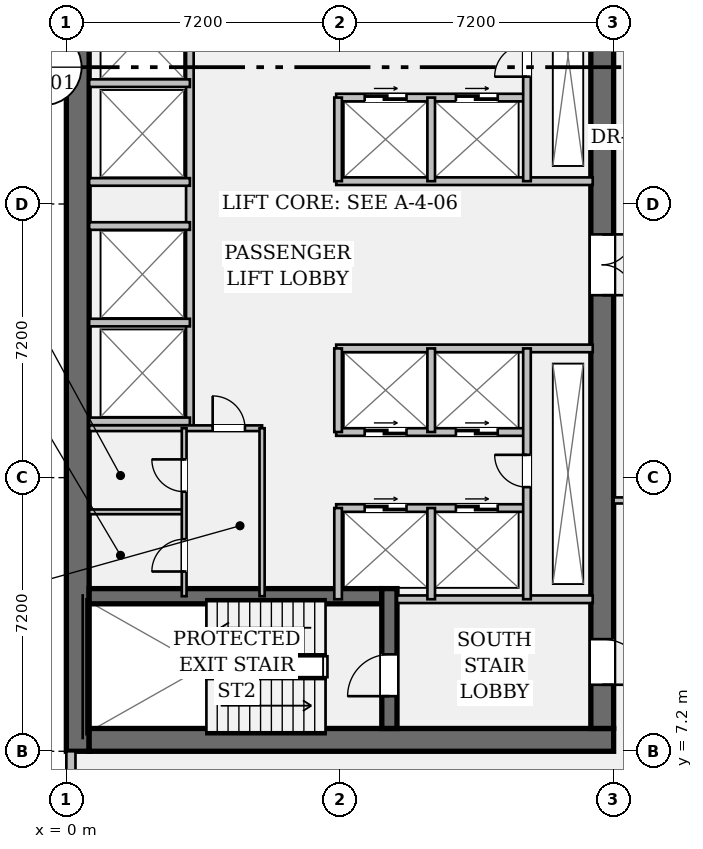
"""IFC4 building model, lengths in metres.
Left out: names, types, materials, properties, quantities, classifications, styles, units other than length and angle.
Written with IfcOpenShell. Run it as: python <this file> out.ifc"""

import sys

from ifc_helpers import new_model, si_unit, direction, frame, frame_2d, origin, place, context, subcontext, project, spatial, rectangle, extrude, element, fill, save


model = new_model("IFC4")
c1 = context("Model", 3, precision=1e-05, world=origin(), true_north=direction((0.0, 1.0)))
c2 = subcontext(c1, "Body", "Model", "MODEL_VIEW")
j1 = project(units=[si_unit("LENGTHUNIT", "METRE"), si_unit("PLANEANGLEUNIT", "RADIAN")], contexts=[c1])
p1 = place(None, origin())
s1 = spatial("IfcSite", under=j1, at=p1, CompositionType="ELEMENT")
p2 = place(p1, origin())
s2 = spatial("IfcBuilding", under=s1, at=p2, CompositionType="ELEMENT")
p3 = place(p2, frame((0.0, 0.0, 97.65)))
s3 = spatial("IfcBuildingStorey", under=s2, at=p3, CompositionType="ELEMENT", Elevation=97.65)
p4 = place(p3, frame((0.3, 7.2, 0.0), z_axis=(0.0, 0.0, 1.0), x_axis=(0.0, 1.0, 0.0)))
e1 = element("IfcWall", 1, at=p4, inside=s3, PredefinedType="SHEAR", context=c2, shape_type="SweptSolid", body=[
    extrude(rectangle(XDim=28.8, YDim=0.6, at=frame_2d((14.4, 0.0))), origin(), (0.0, 0.0, 1.0), 4.28),
])
p5 = place(p3, frame((0.6, 7.5, 0.0), z_axis=(0.0, 0.0, 1.0), x_axis=(1.0, 0.0, 0.0)))
e2 = element("IfcWall", 2, at=p5, inside=s3, PredefinedType="SHEAR", context=c2, shape_type="SweptSolid", body=[
    extrude(rectangle(XDim=13.8, YDim=0.6, at=frame_2d((6.9, 0.0))), origin(), (0.0, 0.0, 1.0), 4.28),
])
p6 = place(p3, frame((14.1, 35.4, 0.0), z_axis=(0.0, 0.0, 1.0), x_axis=(0.0, -1.0, 0.0)))
e3 = element("IfcWall", 3, at=p6, inside=s3, PredefinedType="SHEAR", context=c2, shape_type="SweptSolid", body=[
    extrude(rectangle(XDim=27.6, YDim=0.6, at=frame_2d((13.8, 0.0))), origin(), (0.0, 0.0, 1.0), 4.28),
])
p7 = place(p6, frame((1.3, 0.0, 0.0)))
e4 = element("IfcOpeningElement", 4, at=p7, cuts=e3, PredefinedType="OPENING", context=c2, shape_type="SweptSolid", body=[
    extrude(rectangle(XDim=1.2, YDim=2.15, at=frame_2d((0.6, 1.075))), frame((0.0, 0.312, 0.0), z_axis=(0.0, -1.0, 0.0), x_axis=(1.0, 0.0, 0.0)), (0.0, 0.0, 1.0), 0.624),
])
p8 = place(p6, frame((25.25, 0.0, 0.0)))
e5 = element("IfcOpeningElement", 5, at=p8, cuts=e3, PredefinedType="OPENING", context=c2, shape_type="SweptSolid", body=[
    extrude(rectangle(XDim=1.2, YDim=2.15, at=frame_2d((0.6, 1.075))), frame((0.0, 0.312, 0.0), z_axis=(0.0, -1.0, 0.0), x_axis=(1.0, 0.0, 0.0)), (0.0, 0.0, 1.0), 0.624),
])
p9 = place(p6, frame((14.6, 0.0, 0.0)))
e6 = element("IfcOpeningElement", 6, at=p9, cuts=e3, PredefinedType="OPENING", context=c2, shape_type="SweptSolid", body=[
    extrude(rectangle(XDim=1.6, YDim=2.2, at=frame_2d((0.8, 1.1))), frame((0.0, 0.312, 0.0), z_axis=(0.0, -1.0, 0.0), x_axis=(1.0, 0.0, 0.0)), (0.0, 0.0, 1.0), 0.624),
])
p10 = place(p3, frame((0.6, 11.28, 0.0), z_axis=(0.0, 0.0, 1.0), x_axis=(1.0, 0.0, 0.0)))
e7 = element("IfcWall", 7, at=p10, inside=s3, PredefinedType="SHEAR", context=c2, shape_type="SweptSolid", body=[
    extrude(rectangle(XDim=7.7, YDim=0.4, at=frame_2d((3.85, 0.0))), origin(), (0.0, 0.0, 1.0), 4.28),
])
p11 = place(p3, frame((8.5, 7.8, 0.0), z_axis=(0.0, 0.0, 1.0), x_axis=(0.0, 1.0, 0.0)))
e8 = element("IfcWall", 8, at=p11, inside=s3, PredefinedType="SHEAR", context=c2, shape_type="SweptSolid", body=[
    extrude(rectangle(XDim=3.68, YDim=0.4, at=frame_2d((1.84, 0.0))), origin(), (0.0, 0.0, 1.0), 4.28),
])
p12 = place(p11, frame((0.85, 0.0, 0.0)))
e9 = element("IfcOpeningElement", 9, at=p12, cuts=e8, PredefinedType="OPENING", context=c2, shape_type="SweptSolid", body=[
    extrude(rectangle(XDim=1.1, YDim=2.15, at=frame_2d((0.55, 1.075))), frame((0.0, 0.212, 0.0), z_axis=(0.0, -1.0, 0.0), x_axis=(1.0, 0.0, 0.0)), (0.0, 0.0, 1.0), 0.424),
])
p13 = place(p3, frame((0.12, 5.95, 0.0), z_axis=(0.0, 0.0, 1.0), x_axis=(0.0, 1.0, 0.0)))
e10 = element("IfcWall", 10, at=p13, inside=s3, PredefinedType="STANDARD", context=c2, shape_type="SweptSolid", body=[
    extrude(rectangle(XDim=1.25, YDim=0.24, at=frame_2d((0.625, 0.0))), origin(), (0.0, 0.0, 1.0), 4.28),
])
p14 = place(p3, frame((8.7, 11.2, 0.0), z_axis=(0.0, 0.0, 1.0), x_axis=(1.0, 0.0, 0.0)))
e11 = element("IfcWall", 11, at=p14, inside=s3, PredefinedType="PARTITIONING", context=c2, shape_type="SweptSolid", body=[
    extrude(rectangle(XDim=5.15, YDim=0.2, at=frame_2d((2.575, 0.0))), origin(), (0.0, 0.0, 1.0), 4.28),
])
p15 = place(p3, frame((3.25, 15.7, 0.0), z_axis=(0.0, 0.0, 1.0), x_axis=(0.0, 1.0, 0.0)))
e12 = element("IfcWall", 12, at=p15, inside=s3, PredefinedType="PARTITIONING", context=c2, shape_type="SweptSolid", body=[
    extrude(rectangle(XDim=13.08, YDim=0.2, at=frame_2d((6.54, 0.0))), origin(), (0.0, 0.0, 1.0), 4.28),
])
for number, where, z_axis, x_axis in (
    (13, (0.6, 15.88, 0.0), (0.0, 0.0, 1.0), (1.0, 0.0, 0.0)),
    (14, (0.6, 18.48, 0.0), (0.0, 0.0, 1.0), (1.0, 0.0, 0.0)),
    (15, (0.6, 22.18, 0.0), (0.0, 0.0, 1.0), (1.0, 0.0, 0.0)),
    (16, (0.6, 24.78, 0.0), (0.0, 0.0, 1.0), (1.0, 0.0, 0.0)),
    (17, (0.6, 21.02, 0.0), (0.0, 0.0, 1.0), (1.0, 0.0, 0.0)),
):
    element("IfcWall", number, at=place(p3, frame(where, z_axis=z_axis, x_axis=x_axis)), inside=s3, PredefinedType="PARTITIONING", context=c2, shape_type="SweptSolid", body=[
        extrude(rectangle(XDim=2.65, YDim=0.2, at=frame_2d((1.325, 0.0))), origin(), (0.0, 0.0, 1.0), 4.28),
    ])
p16 = place(p3, frame((7.1, 22.2, 0.0), z_axis=(0.0, 0.0, 1.0), x_axis=(1.0, 0.0, 0.0)))
e18 = element("IfcWall", 18, at=p16, inside=s3, PredefinedType="PARTITIONING", context=c2, shape_type="SweptSolid", body=[
    extrude(rectangle(XDim=6.75, YDim=0.2, at=frame_2d((3.375, 0.0))), origin(), (0.0, 0.0, 1.0), 4.28),
])
p17 = place(p3, frame((7.1, 24.4, 0.0), z_axis=(0.0, 0.0, 1.0), x_axis=(1.0, 0.0, 0.0)))
e19 = element("IfcWall", 19, at=p17, inside=s3, PredefinedType="PARTITIONING", context=c2, shape_type="SweptSolid", body=[
    extrude(rectangle(XDim=5.02, YDim=0.2, at=frame_2d((2.51, 0.0))), origin(), (0.0, 0.0, 1.0), 4.28),
])
p18 = place(p17, frame((0.75, 0.0, 0.0)))
e20 = element("IfcOpeningElement", 20, at=p18, cuts=e19, PredefinedType="OPENING", context=c2, shape_type="SweptSolid", body=[
    extrude(rectangle(XDim=1.1, YDim=2.2, at=frame_2d((0.55, 1.1))), frame((0.0, 0.112, 0.0), z_axis=(0.0, -1.0, 0.0), x_axis=(1.0, 0.0, 0.0)), (0.0, 0.0, 1.0), 0.224),
])
p19 = place(p17, frame((3.15, 0.0, 0.0)))
e21 = element("IfcOpeningElement", 21, at=p19, cuts=e19, PredefinedType="OPENING", context=c2, shape_type="SweptSolid", body=[
    extrude(rectangle(XDim=1.1, YDim=2.2, at=frame_2d((0.55, 1.1))), frame((0.0, 0.112, 0.0), z_axis=(0.0, -1.0, 0.0), x_axis=(1.0, 0.0, 0.0)), (0.0, 0.0, 1.0), 0.224),
])
for number, where, z_axis, x_axis in (
    (22, (7.15, 22.2, 0.0), (0.0, 0.0, 1.0), (0.0, 1.0, 0.0)),
    (23, (9.6, 22.2, 0.0), (0.0, 0.0, 1.0), (0.0, 1.0, 0.0)),
):
    element("IfcWall", number, at=place(p3, frame(where, z_axis=z_axis, x_axis=x_axis)), inside=s3, PredefinedType="PARTITIONING", context=c2, shape_type="SweptSolid", body=[
        extrude(rectangle(XDim=2.2, YDim=0.2, at=frame_2d((1.1, 0.0))), origin(), (0.0, 0.0, 1.0), 4.28),
    ])
p20 = place(p3, frame((12.12, 22.2, 0.0), z_axis=(0.0, 0.0, 1.0), x_axis=(0.0, 1.0, 0.0)))
e24 = element("IfcWall", 24, at=p20, inside=s3, PredefinedType="PARTITIONING", context=c2, shape_type="SweptSolid", body=[
    extrude(rectangle(XDim=6.58, YDim=0.2, at=frame_2d((3.29, 0.0))), origin(), (0.0, 0.0, 1.0), 4.28),
])
p21 = place(p20, frame((2.75, 0.0, 0.0)))
e25 = element("IfcOpeningElement", 25, at=p21, cuts=e24, PredefinedType="OPENING", context=c2, shape_type="SweptSolid", body=[
    extrude(rectangle(XDim=0.85, YDim=2.15, at=frame_2d((0.425, 1.075))), frame((0.0, 0.112, 0.0), z_axis=(0.0, -1.0, 0.0), x_axis=(1.0, 0.0, 0.0)), (0.0, 0.0, 1.0), 0.224),
])
p22 = place(p3, frame((7.1, 17.8, 0.0), z_axis=(0.0, 0.0, 1.0), x_axis=(1.0, 0.0, 0.0)))
e26 = element("IfcWall", 26, at=p22, inside=s3, PredefinedType="PARTITIONING", context=c2, shape_type="SweptSolid", body=[
    extrude(rectangle(XDim=6.75, YDim=0.2, at=frame_2d((3.375, 0.0))), origin(), (0.0, 0.0, 1.0), 4.28),
])
p23 = place(p3, frame((7.1, 15.6, 0.0), z_axis=(0.0, 0.0, 1.0), x_axis=(1.0, 0.0, 0.0)))
e27 = element("IfcWall", 27, at=p23, inside=s3, PredefinedType="PARTITIONING", context=c2, shape_type="SweptSolid", body=[
    extrude(rectangle(XDim=5.02, YDim=0.2, at=frame_2d((2.51, 0.0))), origin(), (0.0, 0.0, 1.0), 4.28),
])
p24 = place(p23, frame((0.75, 0.0, 0.0)))
e28 = element("IfcOpeningElement", 28, at=p24, cuts=e27, PredefinedType="OPENING", context=c2, shape_type="SweptSolid", body=[
    extrude(rectangle(XDim=1.1, YDim=2.2, at=frame_2d((0.55, 1.1))), frame((0.0, 0.112, 0.0), z_axis=(0.0, -1.0, 0.0), x_axis=(1.0, 0.0, 0.0)), (0.0, 0.0, 1.0), 0.224),
])
p25 = place(p23, frame((3.15, 0.0, 0.0)))
e29 = element("IfcOpeningElement", 29, at=p25, cuts=e27, PredefinedType="OPENING", context=c2, shape_type="SweptSolid", body=[
    extrude(rectangle(XDim=1.1, YDim=2.2, at=frame_2d((0.55, 1.1))), frame((0.0, 0.112, 0.0), z_axis=(0.0, -1.0, 0.0), x_axis=(1.0, 0.0, 0.0)), (0.0, 0.0, 1.0), 0.224),
])
p26 = place(p3, frame((7.1, 13.6, 0.0), z_axis=(0.0, 0.0, 1.0), x_axis=(1.0, 0.0, 0.0)))
e30 = element("IfcWall", 30, at=p26, inside=s3, PredefinedType="PARTITIONING", context=c2, shape_type="SweptSolid", body=[
    extrude(rectangle(XDim=5.02, YDim=0.2, at=frame_2d((2.51, 0.0))), origin(), (0.0, 0.0, 1.0), 4.28),
])
p27 = place(p26, frame((0.75, 0.0, 0.0)))
e31 = element("IfcOpeningElement", 31, at=p27, cuts=e30, PredefinedType="OPENING", context=c2, shape_type="SweptSolid", body=[
    extrude(rectangle(XDim=1.1, YDim=2.2, at=frame_2d((0.55, 1.1))), frame((0.0, 0.112, 0.0), z_axis=(0.0, -1.0, 0.0), x_axis=(1.0, 0.0, 0.0)), (0.0, 0.0, 1.0), 0.224),
])
p28 = place(p26, frame((3.15, 0.0, 0.0)))
e32 = element("IfcOpeningElement", 32, at=p28, cuts=e30, PredefinedType="OPENING", context=c2, shape_type="SweptSolid", body=[
    extrude(rectangle(XDim=1.1, YDim=2.2, at=frame_2d((0.55, 1.1))), frame((0.0, 0.112, 0.0), z_axis=(0.0, -1.0, 0.0), x_axis=(1.0, 0.0, 0.0)), (0.0, 0.0, 1.0), 0.224),
])
p29 = place(p3, frame((7.15, 15.6, 0.0), z_axis=(0.0, 0.0, 1.0), x_axis=(0.0, 1.0, 0.0)))
e33 = element("IfcWall", 33, at=p29, inside=s3, PredefinedType="PARTITIONING", context=c2, shape_type="SweptSolid", body=[
    extrude(rectangle(XDim=2.2, YDim=0.2, at=frame_2d((1.1, 0.0))), origin(), (0.0, 0.0, 1.0), 4.28),
])
p30 = place(p3, frame((7.15, 11.2, 0.0), z_axis=(0.0, 0.0, 1.0), x_axis=(0.0, 1.0, 0.0)))
e34 = element("IfcWall", 34, at=p30, inside=s3, PredefinedType="PARTITIONING", context=c2, shape_type="SweptSolid", body=[
    extrude(rectangle(XDim=2.4, YDim=0.2, at=frame_2d((1.2, 0.0))), origin(), (0.0, 0.0, 1.0), 4.28),
])
p31 = place(p3, frame((9.6, 15.6, 0.0), z_axis=(0.0, 0.0, 1.0), x_axis=(0.0, 1.0, 0.0)))
e35 = element("IfcWall", 35, at=p31, inside=s3, PredefinedType="PARTITIONING", context=c2, shape_type="SweptSolid", body=[
    extrude(rectangle(XDim=2.2, YDim=0.2, at=frame_2d((1.1, 0.0))), origin(), (0.0, 0.0, 1.0), 4.28),
])
p32 = place(p3, frame((9.6, 11.2, 0.0), z_axis=(0.0, 0.0, 1.0), x_axis=(0.0, 1.0, 0.0)))
e36 = element("IfcWall", 36, at=p32, inside=s3, PredefinedType="PARTITIONING", context=c2, shape_type="SweptSolid", body=[
    extrude(rectangle(XDim=2.4, YDim=0.2, at=frame_2d((1.2, 0.0))), origin(), (0.0, 0.0, 1.0), 4.28),
])
p33 = place(p3, frame((12.12, 11.2, 0.0), z_axis=(0.0, 0.0, 1.0), x_axis=(0.0, 1.0, 0.0)))
e37 = element("IfcWall", 37, at=p33, inside=s3, PredefinedType="PARTITIONING", context=c2, shape_type="SweptSolid", body=[
    extrude(rectangle(XDim=6.6, YDim=0.2, at=frame_2d((3.3, 0.0))), origin(), (0.0, 0.0, 1.0), 4.28),
])
p34 = place(p33, frame((2.95, 0.0, 0.0)))
e38 = element("IfcOpeningElement", 38, at=p34, cuts=e37, PredefinedType="OPENING", context=c2, shape_type="SweptSolid", body=[
    extrude(rectangle(XDim=0.85, YDim=2.15, at=frame_2d((0.425, 1.075))), frame((0.0, 0.112, 0.0), z_axis=(0.0, -1.0, 0.0), x_axis=(1.0, 0.0, 0.0)), (0.0, 0.0, 1.0), 0.224),
])
p35 = place(p3, frame((0.6, 15.7, 0.0), z_axis=(0.0, 0.0, 1.0), x_axis=(1.0, 0.0, 0.0)))
e39 = element("IfcWall", 39, at=p35, inside=s3, PredefinedType="PARTITIONING", context=c2, shape_type="SweptSolid", body=[
    extrude(rectangle(XDim=4.55, YDim=0.15, at=frame_2d((2.275, 0.0))), origin(), (0.0, 0.0, 1.0), 4.28),
])
p36 = place(p35, frame((3.25, 0.0, 0.0)))
e40 = element("IfcOpeningElement", 40, at=p36, cuts=e39, PredefinedType="OPENING", context=c2, shape_type="SweptSolid", body=[
    extrude(rectangle(XDim=0.85, YDim=2.15, at=frame_2d((0.425, 1.075))), frame((0.0, 0.087, 0.0), z_axis=(0.0, -1.0, 0.0), x_axis=(1.0, 0.0, 0.0)), (0.0, 0.0, 1.0), 0.174),
])
p37 = place(p3, frame((5.15, 11.28, 0.0), z_axis=(0.0, 0.0, 1.0), x_axis=(0.0, 1.0, 0.0)))
e41 = element("IfcWall", 41, at=p37, inside=s3, PredefinedType="PARTITIONING", context=c2, shape_type="SweptSolid", body=[
    extrude(rectangle(XDim=4.42, YDim=0.135, at=frame_2d((2.21, 0.0))), origin(), (0.0, 0.0, 1.0), 4.28),
])
p38 = place(p3, frame((0.6, 13.5, 0.0), z_axis=(0.0, 0.0, 1.0), x_axis=(1.0, 0.0, 0.0)))
e42 = element("IfcWall", 42, at=p38, inside=s3, PredefinedType="PARTITIONING", context=c2, shape_type="SweptSolid", body=[
    extrude(rectangle(XDim=2.5, YDim=0.125, at=frame_2d((1.25, 0.0))), origin(), (0.0, 0.0, 1.0), 4.28),
])
p39 = place(p3, frame((3.1, 11.28, 0.0), z_axis=(0.0, 0.0, 1.0), x_axis=(0.0, 1.0, 0.0)))
e43 = element("IfcWall", 43, at=p39, inside=s3, PredefinedType="PARTITIONING", context=c2, shape_type="SweptSolid", body=[
    extrude(rectangle(XDim=4.42, YDim=0.125, at=frame_2d((2.21, 0.0))), origin(), (0.0, 0.0, 1.0), 4.28),
])
p40 = place(p39, frame((0.65, 0.0, 0.0)))
e44 = element("IfcOpeningElement", 44, at=p40, cuts=e43, PredefinedType="OPENING", context=c2, shape_type="SweptSolid", body=[
    extrude(rectangle(XDim=0.85, YDim=2.15, at=frame_2d((0.425, 1.075))), frame((0.0, 0.074, 0.0), z_axis=(0.0, -1.0, 0.0), x_axis=(1.0, 0.0, 0.0)), (0.0, 0.0, 1.0), 0.149),
])
p41 = place(p39, frame((2.75, 0.0, 0.0)))
e45 = element("IfcOpeningElement", 45, at=p41, cuts=e43, PredefinedType="OPENING", context=c2, shape_type="SweptSolid", body=[
    extrude(rectangle(XDim=0.85, YDim=2.15, at=frame_2d((0.425, 1.075))), frame((0.0, 0.074, 0.0), z_axis=(0.0, -1.0, 0.0), x_axis=(1.0, 0.0, 0.0)), (0.0, 0.0, 1.0), 0.149),
])
p42 = place(p3, frame((14.4, 13.8, 0.0), z_axis=(0.0, 0.0, 1.0), x_axis=(1.0, 0.0, 0.0)))
e46 = element("IfcWall", 46, at=p42, inside=s3, PredefinedType="PARTITIONING", context=c2, shape_type="SweptSolid", body=[
    extrude(rectangle(XDim=32.68, YDim=0.16, at=frame_2d((16.34, 0.0))), origin(), (0.0, 0.0, 1.0), 3.493),
])
p43 = place(p42, frame((4.72, 0.0, 0.0)))
e47 = element("IfcOpeningElement", 47, at=p43, cuts=e46, PredefinedType="OPENING", context=c2, shape_type="SweptSolid", body=[
    extrude(rectangle(XDim=1.05, YDim=2.15, at=frame_2d((0.525, 1.075))), frame((0.0, 0.092, 0.0), z_axis=(0.0, -1.0, 0.0), x_axis=(1.0, 0.0, 0.0)), (0.0, 0.0, 1.0), 0.184),
])
p44 = place(p42, frame((13.0, 0.0, 0.0)))
e48 = element("IfcOpeningElement", 48, at=p44, cuts=e46, PredefinedType="OPENING", context=c2, shape_type="SweptSolid", body=[
    extrude(rectangle(XDim=0.98, YDim=2.15, at=frame_2d((0.49, 1.075))), frame((0.0, 0.092, 0.0), z_axis=(0.0, -1.0, 0.0), x_axis=(1.0, 0.0, 0.0)), (0.0, 0.0, 1.0), 0.184),
])
p45 = place(p12, origin())
e49 = element("IfcDoor", 49, at=p45, inside=s3, OperationType="SINGLE_SWING_LEFT", PredefinedType="DOOR", context=c2, shape_type="SweptSolid", body=[
    extrude(rectangle(XDim=1.1, YDim=2.15, at=frame_2d((0.55, 1.075))), frame((0.0, 0.025, 0.0), z_axis=(0.0, -1.0, 0.0), x_axis=(1.0, 0.0, 0.0)), (0.0, 0.0, 1.0), 0.05),
])
fill(e9, e49)
p46 = place(p8, origin())
e50 = element("IfcDoor", 50, at=p46, inside=s3, OperationType="SINGLE_SWING_RIGHT", PredefinedType="DOOR", context=c2, shape_type="SweptSolid", body=[
    extrude(rectangle(XDim=1.2, YDim=2.15, at=frame_2d((0.6, 1.075))), frame((0.0, 0.025, 0.0), z_axis=(0.0, -1.0, 0.0), x_axis=(1.0, 0.0, 0.0)), (0.0, 0.0, 1.0), 0.05),
])
fill(e5, e50)
p47 = place(p9, origin())
e51 = element("IfcDoor", 51, at=p47, inside=s3, OperationType="DOUBLE_DOOR_SINGLE_SWING", PredefinedType="DOOR", context=c2, shape_type="SweptSolid", body=[
    extrude(rectangle(XDim=1.6, YDim=2.2, at=frame_2d((0.8, 1.1))), frame((0.0, 0.025, 0.0), z_axis=(0.0, -1.0, 0.0), x_axis=(1.0, 0.0, 0.0)), (0.0, 0.0, 1.0), 0.05),
])
fill(e6, e51)
p48 = place(p21, origin())
e52 = element("IfcDoor", 52, at=p48, inside=s3, OperationType="SINGLE_SWING_LEFT", PredefinedType="DOOR", context=c2, shape_type="SweptSolid", body=[
    extrude(rectangle(XDim=0.85, YDim=2.15, at=frame_2d((0.425, 1.075))), frame((0.0, 0.025, 0.0), z_axis=(0.0, -1.0, 0.0), x_axis=(1.0, 0.0, 0.0)), (0.0, 0.0, 1.0), 0.05),
])
fill(e25, e52)
p49 = place(p18, origin())
e53 = element("IfcDoor", 53, at=p49, inside=s3, OperationType="DOUBLE_DOOR_SLIDING", PredefinedType="DOOR", context=c2, shape_type="SweptSolid", body=[
    extrude(rectangle(XDim=1.1, YDim=2.2, at=frame_2d((0.55, 1.1))), frame((0.0, 0.025, 0.0), z_axis=(0.0, -1.0, 0.0), x_axis=(1.0, 0.0, 0.0)), (0.0, 0.0, 1.0), 0.05),
])
fill(e20, e53)
p50 = place(p19, origin())
e54 = element("IfcDoor", 54, at=p50, inside=s3, OperationType="DOUBLE_DOOR_SLIDING", PredefinedType="DOOR", context=c2, shape_type="SweptSolid", body=[
    extrude(rectangle(XDim=1.1, YDim=2.2, at=frame_2d((0.55, 1.1))), frame((0.0, 0.025, 0.0), z_axis=(0.0, -1.0, 0.0), x_axis=(1.0, 0.0, 0.0)), (0.0, 0.0, 1.0), 0.05),
])
fill(e21, e54)
p51 = place(p34, origin())
e55 = element("IfcDoor", 55, at=p51, inside=s3, OperationType="SINGLE_SWING_RIGHT", PredefinedType="DOOR", context=c2, shape_type="SweptSolid", body=[
    extrude(rectangle(XDim=0.85, YDim=2.15, at=frame_2d((0.425, 1.075))), frame((0.0, 0.025, 0.0), z_axis=(0.0, -1.0, 0.0), x_axis=(1.0, 0.0, 0.0)), (0.0, 0.0, 1.0), 0.05),
])
fill(e38, e55)
p52 = place(p24, origin())
e56 = element("IfcDoor", 56, at=p52, inside=s3, OperationType="DOUBLE_DOOR_SLIDING", PredefinedType="DOOR", context=c2, shape_type="SweptSolid", body=[
    extrude(rectangle(XDim=1.1, YDim=2.2, at=frame_2d((0.55, 1.1))), frame((0.0, 0.025, 0.0), z_axis=(0.0, -1.0, 0.0), x_axis=(1.0, 0.0, 0.0)), (0.0, 0.0, 1.0), 0.05),
])
fill(e28, e56)
p53 = place(p25, origin())
e57 = element("IfcDoor", 57, at=p53, inside=s3, OperationType="DOUBLE_DOOR_SLIDING", PredefinedType="DOOR", context=c2, shape_type="SweptSolid", body=[
    extrude(rectangle(XDim=1.1, YDim=2.2, at=frame_2d((0.55, 1.1))), frame((0.0, 0.025, 0.0), z_axis=(0.0, -1.0, 0.0), x_axis=(1.0, 0.0, 0.0)), (0.0, 0.0, 1.0), 0.05),
])
fill(e29, e57)
p54 = place(p27, origin())
e58 = element("IfcDoor", 58, at=p54, inside=s3, OperationType="DOUBLE_DOOR_SLIDING", PredefinedType="DOOR", context=c2, shape_type="SweptSolid", body=[
    extrude(rectangle(XDim=1.1, YDim=2.2, at=frame_2d((0.55, 1.1))), frame((0.0, 0.025, 0.0), z_axis=(0.0, -1.0, 0.0), x_axis=(1.0, 0.0, 0.0)), (0.0, 0.0, 1.0), 0.05),
])
fill(e31, e58)
p55 = place(p28, origin())
e59 = element("IfcDoor", 59, at=p55, inside=s3, OperationType="DOUBLE_DOOR_SLIDING", PredefinedType="DOOR", context=c2, shape_type="SweptSolid", body=[
    extrude(rectangle(XDim=1.1, YDim=2.2, at=frame_2d((0.55, 1.1))), frame((0.0, 0.025, 0.0), z_axis=(0.0, -1.0, 0.0), x_axis=(1.0, 0.0, 0.0)), (0.0, 0.0, 1.0), 0.05),
])
fill(e32, e59)
p56 = place(p36, origin())
e60 = element("IfcDoor", 60, at=p56, inside=s3, OperationType="SINGLE_SWING_LEFT", PredefinedType="DOOR", context=c2, shape_type="SweptSolid", body=[
    extrude(rectangle(XDim=0.85, YDim=2.15, at=frame_2d((0.425, 1.075))), frame((0.0, 0.025, 0.0), z_axis=(0.0, -1.0, 0.0), x_axis=(1.0, 0.0, 0.0)), (0.0, 0.0, 1.0), 0.05),
])
fill(e40, e60)
p57 = place(p40, origin())
e61 = element("IfcDoor", 61, at=p57, inside=s3, OperationType="SINGLE_SWING_LEFT", PredefinedType="DOOR", context=c2, shape_type="SweptSolid", body=[
    extrude(rectangle(XDim=0.85, YDim=2.15, at=frame_2d((0.425, 1.075))), frame((0.0, 0.025, 0.0), z_axis=(0.0, -1.0, 0.0), x_axis=(1.0, 0.0, 0.0)), (0.0, 0.0, 1.0), 0.05),
])
fill(e44, e61)
p58 = place(p41, origin())
e62 = element("IfcDoor", 62, at=p58, inside=s3, OperationType="SINGLE_SWING_RIGHT", PredefinedType="DOOR", context=c2, shape_type="SweptSolid", body=[
    extrude(rectangle(XDim=0.85, YDim=2.15, at=frame_2d((0.425, 1.075))), frame((0.0, 0.025, 0.0), z_axis=(0.0, -1.0, 0.0), x_axis=(1.0, 0.0, 0.0)), (0.0, 0.0, 1.0), 0.05),
])
fill(e45, e62)
save(model, sys.argv[1])
